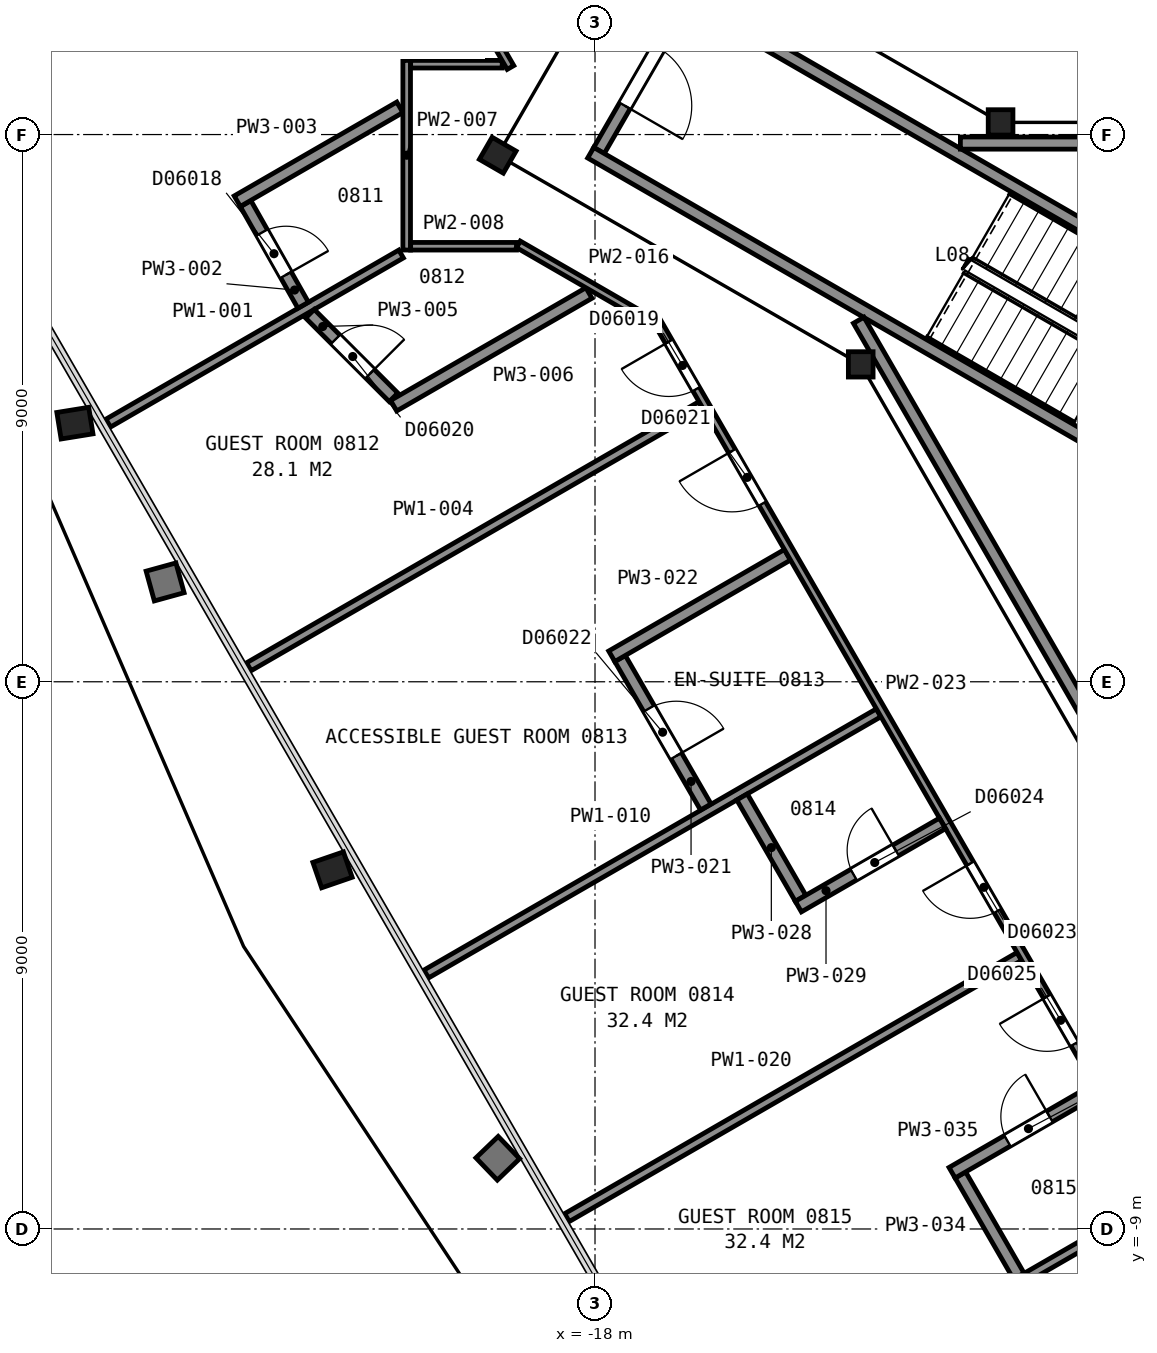
"""IFC4 building model, lengths in metres.
Left out: names, types, materials, properties, quantities, classifications, styles, units other than length and angle.
Written with IfcOpenShell. Run it as: python <this file> out.ifc"""

import sys

from ifc_helpers import new_model, si_unit, direction, frame, frame_2d, origin, origin_2d, place, context, subcontext, project, spatial, rectangle, i_section, extrude, element, fill, save


model = new_model("IFC4")
c1 = context("Model", 3, precision=1e-05, world=origin(), true_north=direction((0.0, 1.0)))
c2 = subcontext(c1, "Body", "Model", "MODEL_VIEW")
j1 = project(units=[si_unit("LENGTHUNIT", "METRE"), si_unit("PLANEANGLEUNIT", "RADIAN")], contexts=[c1])
p1 = place(None, origin())
s1 = spatial("IfcSite", under=j1, at=p1, CompositionType="ELEMENT")
p2 = place(p1, origin())
s2 = spatial("IfcBuilding", under=s1, at=p2, CompositionType="ELEMENT")
p3 = place(p2, frame((0.0, 0.0, 44.0)))
s3 = spatial("IfcBuildingStorey", under=s2, at=p3, CompositionType="ELEMENT", Elevation=44.0)
p4 = place(p3, frame((-26.452, 4.27, 0.025), z_axis=(-0.085775681498, -0.013907718326, 0.996217399885), x_axis=(-0.500475890564, 0.865194817097, -0.031013084871)))
e1 = element("IfcColumn", 1, at=p4, inside=s3, PredefinedType="COLUMN", context=c2, shape_type="SweptSolid", body=[
    extrude(i_section(OverallWidth=0.442, OverallDepth=0.531, WebThickness=0.066, FlangeThickness=0.106, FilletRadius=0.015, at=origin_2d()), origin(), (0.0, 0.0, 1.0), 3.563),
])
p5 = place(p3, frame((-22.222, -3.061, 0.025), z_axis=(-0.080308514275, -0.02761461711, 0.996387462515), x_axis=(-0.499182208178, 0.866345153128, -0.016223399441)))
e2 = element("IfcColumn", 2, at=p5, inside=s3, PredefinedType="COLUMN", context=c2, shape_type="SweptSolid", body=[
    extrude(i_section(OverallWidth=0.442, OverallDepth=0.531, WebThickness=0.066, FlangeThickness=0.106, FilletRadius=0.015, at=origin_2d()), origin(), (0.0, 0.0, 1.0), 3.563),
])
p6 = place(p3, frame((-11.33, 9.2, 0.0), z_axis=(0.0, 0.0, 1.0), x_axis=(1.0, 0.0, 0.0)))
e3 = element("IfcColumn", 3, at=p6, inside=s3, PredefinedType="COLUMN", context=c2, shape_type="SweptSolid", body=[
    extrude(i_section(OverallWidth=0.406, OverallDepth=0.417, WebThickness=0.03, FlangeThickness=0.048, FilletRadius=0.015, at=origin_2d()), origin(), (0.0, 0.0, 1.0), 3.6),
])
p7 = place(p3, frame((-19.6, 8.66, 0.0), z_axis=(0.0, 0.0, 1.0), x_axis=(0.5, 0.866025403784, 0.0)))
e4 = element("IfcColumn", 4, at=p7, inside=s3, PredefinedType="COLUMN", context=c2, shape_type="SweptSolid", body=[
    extrude(i_section(OverallWidth=0.419, OverallDepth=0.455, WebThickness=0.042, FlangeThickness=0.068, FilletRadius=0.015, at=origin_2d()), origin(), (0.0, 0.0, 1.0), 3.6),
])
p8 = place(p3, frame((-13.63, 5.22, 0.0), z_axis=(0.0, 0.0, 1.0), x_axis=(1.0, 0.0, 0.0)))
e5 = element("IfcColumn", 5, at=p8, inside=s3, PredefinedType="COLUMN", context=c2, shape_type="SweptSolid", body=[
    extrude(i_section(OverallWidth=0.406, OverallDepth=0.417, WebThickness=0.03, FlangeThickness=0.048, FilletRadius=0.015, at=origin_2d()), origin(), (0.0, 0.0, 1.0), 3.6),
])
p9 = place(p3, frame((-16.534, 11.162, 0.0), z_axis=(0.0, 0.0, 1.0), x_axis=(-0.49998411664, -0.866034573852, 0.0)))
e6 = element("IfcWall", 6, at=p9, inside=s3, PredefinedType="PARTITIONING", context=c2, shape_type="SweptSolid", body=[
    extrude(rectangle(XDim=2.8, YDim=0.2, at=frame_2d((1.4, 0.0))), origin(), (0.0, 0.0, 1.0), 3.35),
])
p10 = place(p9, frame((0.85, 0.0, 0.0)))
e7 = element("IfcOpeningElement", 7, at=p10, cuts=e6, PredefinedType="OPENING", context=c2, shape_type="SweptSolid", body=[
    extrude(rectangle(XDim=1.1, YDim=2.1, at=frame_2d((0.55, 1.05))), frame((0.0, 0.11, 0.0), z_axis=(0.0, -1.0, 0.0), x_axis=(1.0, 0.0, 0.0)), (0.0, 0.0, 1.0), 0.22),
])
for number, where, z_axis, x_axis in (
    (8, (-7.678, 2.701, 0.0), (0.0, 0.0, 1.0), (-0.866, 0.5, 0.0)),
    (9, (-6.178, 5.299, 0.0), (0.0, 0.0, 1.0), (-0.866, 0.5, 0.0)),
):
    element("IfcWall", number, at=place(p3, frame(where, z_axis=z_axis, x_axis=x_axis)), inside=s3, PredefinedType="PARTITIONING", context=c2, shape_type="SweptSolid", body=[
        extrude(rectangle(XDim=12.0, YDim=0.2, at=frame_2d((6.0, 0.0))), origin(), (0.0, 0.0, 1.0), 3.35),
    ])
p11 = place(p3, frame((-13.664, 5.946, 0.0), z_axis=(0.0, 0.0, 1.0), x_axis=(0.499994327219, -0.866028678941, 0.0)))
e10 = element("IfcWall", 10, at=p11, inside=s3, PredefinedType="PARTITIONING", context=c2, shape_type="SweptSolid", body=[
    extrude(rectangle(XDim=23.968, YDim=0.2, at=frame_2d((11.984, 0.0))), origin(), (0.0, 0.0, 1.0), 3.35),
])
p12 = place(p3, frame((0.263, 8.86, 0.0), z_axis=(0.0, 0.0, 1.0), x_axis=(-1.0, 0.0, 0.0)))
e11 = element("IfcWall", 11, at=p12, inside=s3, PredefinedType="PARTITIONING", context=c2, shape_type="SweptSolid", body=[
    extrude(rectangle(XDim=12.254, YDim=0.2, at=frame_2d((6.127, 0.0))), origin(), (0.0, 0.0, 1.0), 3.35),
])
p13 = place(p12, frame((5.709, 0.0, 0.0)))
e12 = element("IfcOpeningElement", 12, at=p13, cuts=e11, PredefinedType="OPENING", context=c2, shape_type="SweptSolid", body=[
    extrude(rectangle(XDim=1.8, YDim=2.1, at=frame_2d((0.9, 1.05))), frame((0.0, 0.11, 0.0), z_axis=(0.0, -1.0, 0.0), x_axis=(1.0, 0.0, 0.0)), (0.0, 0.0, 1.0), 0.22),
])
p14 = place(p3, frame((-26.006, 4.254, 0.0), z_axis=(0.0, 0.0, 1.0), x_axis=(0.865981654797, 0.500075767815, 0.0)))
e13 = element("IfcWall", 13, at=p14, inside=s3, PredefinedType="PARTITIONING", context=c2, shape_type="SweptSolid", body=[
    extrude(rectangle(XDim=5.563, YDim=0.15, at=frame_2d((2.781, 0.0))), origin(), (0.0, 0.0, 1.0), 2.613),
])
p15 = place(p3, frame((-23.745, 7.863, 0.0), z_axis=(0.0, 0.0, 1.0), x_axis=(0.492970842961, -0.870045830971, 0.0)))
e14 = element("IfcWall", 14, at=p15, inside=s3, PredefinedType="PARTITIONING", context=c2, shape_type="SweptSolid", body=[
    extrude(rectangle(XDim=1.919, YDim=0.2, at=frame_2d((0.959, 0.0))), origin(), (0.0, 0.0, 1.0), 2.613),
])
p16 = place(p15, frame((0.545, 0.0, 0.0)))
e15 = element("IfcOpeningElement", 15, at=p16, cuts=e14, PredefinedType="OPENING", context=c2, shape_type="SweptSolid", body=[
    extrude(rectangle(XDim=0.8, YDim=2.1, at=frame_2d((0.4, 1.05))), frame((0.0, 0.11, 0.0), z_axis=(0.0, -1.0, 0.0), x_axis=(1.0, 0.0, 0.0)), (0.0, 0.0, 1.0), 0.22),
])
p17 = place(p3, frame((-23.884, 7.904, 0.0), z_axis=(0.0, 0.0, 1.0), x_axis=(0.866015731669, 0.500016752221, 0.0)))
e16 = element("IfcWall", 16, at=p17, inside=s3, PredefinedType="PARTITIONING", context=c2, shape_type="SweptSolid", body=[
    extrude(rectangle(XDim=3.088, YDim=0.2, at=frame_2d((1.544, 0.0))), origin(), (0.0, 0.0, 1.0), 2.613),
])
p18 = place(p3, frame((-23.693, 0.247, 0.0), z_axis=(0.0, 0.0, 1.0), x_axis=(0.866031705461, 0.499989085017, 0.0)))
e17 = element("IfcWall", 17, at=p18, inside=s3, PredefinedType="PARTITIONING", context=c2, shape_type="SweptSolid", body=[
    extrude(rectangle(XDim=8.587, YDim=0.15, at=frame_2d((4.293, 0.0))), origin(), (0.0, 0.0, 1.0), 2.613),
])
p19 = place(p3, frame((-22.688, 6.053, 0.0), z_axis=(0.0, 0.0, 1.0), x_axis=(0.707106781187, -0.707106781187, 0.0)))
e18 = element("IfcWall", 18, at=p19, inside=s3, PredefinedType="PARTITIONING", context=c2, shape_type="SweptSolid", body=[
    extrude(rectangle(XDim=1.944, YDim=0.2, at=frame_2d((0.972, 0.0))), origin(), (0.0, 0.0, 1.0), 2.613),
])
p20 = place(p19, frame((0.595, 0.0, 0.0)))
e19 = element("IfcOpeningElement", 19, at=p20, cuts=e18, PredefinedType="OPENING", context=c2, shape_type="SweptSolid", body=[
    extrude(rectangle(XDim=0.8, YDim=2.1, at=frame_2d((0.4, 1.05))), frame((0.0, 0.11, 0.0), z_axis=(0.0, -1.0, 0.0), x_axis=(1.0, 0.0, 0.0)), (0.0, 0.0, 1.0), 0.22),
])
p21 = place(p3, frame((-21.312, 4.54, 0.0), z_axis=(0.0, 0.0, 1.0), x_axis=(0.866071583234, 0.499920006315, 0.0)))
e20 = element("IfcWall", 20, at=p21, inside=s3, PredefinedType="PARTITIONING", context=c2, shape_type="SweptSolid", body=[
    extrude(rectangle(XDim=3.708, YDim=0.2, at=frame_2d((1.854, 0.0))), origin(), (0.0, 0.0, 1.0), 2.613),
])
p22 = place(p3, frame((-21.097, 7.101, 0.0), z_axis=(0.0, 0.0, 1.0), x_axis=(0.0, 1.0, 0.0)))
e21 = element("IfcWall", 21, at=p22, inside=s3, PredefinedType="PARTITIONING", context=c2, shape_type="SweptSolid", body=[
    extrude(rectangle(XDim=3.119, YDim=0.125, at=frame_2d((1.56, 0.0))), origin(), (0.0, 0.0, 1.0), 2.613),
])
p23 = place(p3, frame((-21.032, 7.163, 0.0), z_axis=(0.0, 0.0, 1.0), x_axis=(1.0, 0.0, 0.0)))
e22 = element("IfcWall", 22, at=p23, inside=s3, PredefinedType="PARTITIONING", context=c2, shape_type="SweptSolid", body=[
    extrude(rectangle(XDim=1.741, YDim=0.125, at=frame_2d((0.871, 0.0))), origin(), (0.0, 0.0, 1.0), 2.613),
])
p24 = place(p3, frame((-21.032, 10.157, 0.0), z_axis=(0.0, 0.0, 1.0), x_axis=(1.0, 0.0, 0.0)))
e23 = element("IfcWall", 23, at=p24, inside=s3, PredefinedType="PARTITIONING", context=c2, shape_type="SweptSolid", body=[
    extrude(rectangle(XDim=1.506, YDim=0.125, at=frame_2d((0.753, 0.0))), origin(), (0.0, 0.0, 1.0), 2.613),
])
p25 = place(p3, frame((-20.775, -4.806, 0.0), z_axis=(0.0, 0.0, 1.0), x_axis=(0.865995804368, 0.50005126419, 0.0)))
e24 = element("IfcWall", 24, at=p25, inside=s3, PredefinedType="PARTITIONING", context=c2, shape_type="SweptSolid", body=[
    extrude(rectangle(XDim=8.591, YDim=0.15, at=frame_2d((4.295, 0.0))), origin(), (0.0, 0.0, 1.0), 2.613),
])
p26 = place(p3, frame((-20.293, 11.666, 0.0), z_axis=(0.0, 0.0, 1.0), x_axis=(0.500327160669, -0.865836435071, 0.0)))
e25 = element("IfcWall", 25, at=p26, inside=s3, PredefinedType="PARTITIONING", context=c2, shape_type="SweptSolid", body=[
    extrude(rectangle(XDim=1.805, YDim=0.125, at=frame_2d((0.903, 0.0))), origin(), (0.0, 0.0, 1.0), 2.613),
])
p27 = place(p3, frame((-19.26, 7.194, 0.0), z_axis=(0.0, 0.0, 1.0), x_axis=(0.865944638795, -0.50013986298, 0.0)))
e26 = element("IfcWall", 26, at=p27, inside=s3, PredefinedType="PARTITIONING", context=c2, shape_type="SweptSolid", body=[
    extrude(rectangle(XDim=2.599, YDim=0.125, at=frame_2d((1.299, 0.0))), origin(), (0.0, 0.0, 1.0), 2.613),
])
p28 = place(p3, frame((-18.462, -8.813, 0.0), z_axis=(0.0, 0.0, 1.0), x_axis=(0.866029425019, 0.499993034952, 0.0)))
e27 = element("IfcWall", 27, at=p28, inside=s3, PredefinedType="PARTITIONING", context=c2, shape_type="SweptSolid", body=[
    extrude(rectangle(XDim=8.591, YDim=0.15, at=frame_2d((4.296, 0.0))), origin(), (0.0, 0.0, 1.0), 2.613),
])
p29 = place(p3, frame((-17.588, 0.382, 0.0), z_axis=(0.0, 0.0, 1.0), x_axis=(0.499984757355, -0.866034203951, 0.0)))
e28 = element("IfcWall", 28, at=p29, inside=s3, PredefinedType="PARTITIONING", context=c2, shape_type="SweptSolid", body=[
    extrude(rectangle(XDim=2.82, YDim=0.2, at=frame_2d((1.41, 0.0))), origin(), (0.0, 0.0, 1.0), 2.613),
])
p30 = place(p29, frame((0.95, 0.0, 0.0)))
e29 = element("IfcOpeningElement", 29, at=p30, cuts=e28, PredefinedType="OPENING", context=c2, shape_type="SweptSolid", body=[
    extrude(rectangle(XDim=0.9, YDim=2.1, at=frame_2d((0.45, 1.05))), frame((0.0, 0.11, 0.0), z_axis=(0.0, -1.0, 0.0), x_axis=(1.0, 0.0, 0.0)), (0.0, 0.0, 1.0), 0.22),
])
p31 = place(p3, frame((-17.725, 0.419, 0.0), z_axis=(0.0, 0.0, 1.0), x_axis=(0.865960142641, 0.500113018585, 0.0)))
e30 = element("IfcWall", 30, at=p31, inside=s3, PredefinedType="PARTITIONING", context=c2, shape_type="SweptSolid", body=[
    extrude(rectangle(XDim=3.337, YDim=0.2, at=frame_2d((1.668, 0.0))), origin(), (0.0, 0.0, 1.0), 2.613),
])
p32 = place(p3, frame((-3.766, -16.958, 0.0), z_axis=(0.0, 0.0, 1.0), x_axis=(-0.500024758804, 0.866011108811, 0.0)))
e31 = element("IfcWall", 31, at=p32, inside=s3, PredefinedType="PARTITIONING", context=c2, shape_type="SweptSolid", body=[
    extrude(rectangle(XDim=26.402, YDim=0.125, at=frame_2d((13.201, 0.0))), origin(), (0.0, 0.0, 1.0), 2.613),
])
p33 = place(p32, frame((25.139, 0.0, 0.0)))
e32 = element("IfcOpeningElement", 32, at=p33, cuts=e31, PredefinedType="OPENING", context=c2, shape_type="SweptSolid", body=[
    extrude(rectangle(XDim=0.9, YDim=2.1, at=frame_2d((0.45, 1.05))), frame((0.0, 0.073, 0.0), z_axis=(0.0, -1.0, 0.0), x_axis=(1.0, 0.0, 0.0)), (0.0, 0.0, 1.0), 0.145),
])
p34 = place(p32, frame((22.963, 0.0, 0.0)))
e33 = element("IfcOpeningElement", 33, at=p34, cuts=e31, PredefinedType="OPENING", context=c2, shape_type="SweptSolid", body=[
    extrude(rectangle(XDim=1.0, YDim=2.1, at=frame_2d((0.5, 1.05))), frame((0.0, 0.073, 0.0), z_axis=(0.0, -1.0, 0.0), x_axis=(1.0, 0.0, 0.0)), (0.0, 0.0, 1.0), 0.145),
])
p35 = place(p32, frame((15.228, 0.0, 0.0)))
e34 = element("IfcOpeningElement", 34, at=p35, cuts=e31, PredefinedType="OPENING", context=c2, shape_type="SweptSolid", body=[
    extrude(rectangle(XDim=0.9, YDim=2.1, at=frame_2d((0.45, 1.05))), frame((0.0, 0.073, 0.0), z_axis=(0.0, -1.0, 0.0), x_axis=(1.0, 0.0, 0.0)), (0.0, 0.0, 1.0), 0.145),
])
p36 = place(p32, frame((12.702, 0.0, 0.0)))
e35 = element("IfcOpeningElement", 35, at=p36, cuts=e31, PredefinedType="OPENING", context=c2, shape_type="SweptSolid", body=[
    extrude(rectangle(XDim=0.9, YDim=2.1, at=frame_2d((0.45, 1.05))), frame((0.0, 0.073, 0.0), z_axis=(0.0, -1.0, 0.0), x_axis=(1.0, 0.0, 0.0)), (0.0, 0.0, 1.0), 0.145),
])
p37 = place(p32, frame((5.624, 0.0, 0.0)))
e36 = element("IfcOpeningElement", 36, at=p37, cuts=e31, PredefinedType="OPENING", context=c2, shape_type="SweptSolid", body=[
    extrude(rectangle(XDim=0.9, YDim=2.1, at=frame_2d((0.45, 1.05))), frame((0.0, 0.073, 0.0), z_axis=(0.0, -1.0, 0.0), x_axis=(1.0, 0.0, 0.0)), (0.0, 0.0, 1.0), 0.145),
])
p38 = place(p32, frame((2.843, 0.0, 0.0)))
e37 = element("IfcOpeningElement", 37, at=p38, cuts=e31, PredefinedType="OPENING", context=c2, shape_type="SweptSolid", body=[
    extrude(rectangle(XDim=0.9, YDim=2.1, at=frame_2d((0.45, 1.05))), frame((0.0, 0.073, 0.0), z_axis=(0.0, -1.0, 0.0), x_axis=(1.0, 0.0, 0.0)), (0.0, 0.0, 1.0), 0.145),
])
p39 = place(p3, frame((-16.148, -12.821, 0.0), z_axis=(0.0, 0.0, 1.0), x_axis=(0.866036528751, 0.499980730498, 0.0)))
e38 = element("IfcWall", 38, at=p39, inside=s3, PredefinedType="PARTITIONING", context=c2, shape_type="SweptSolid", body=[
    extrude(rectangle(XDim=8.592, YDim=0.15, at=frame_2d((4.296, 0.0))), origin(), (0.0, 0.0, 1.0), 2.613),
])
p40 = place(p3, frame((-15.582, -1.894, 0.0), z_axis=(0.0, 0.0, 1.0), x_axis=(0.500026156197, -0.86601030197, 0.0)))
e39 = element("IfcWall", 39, at=p40, inside=s3, PredefinedType="PARTITIONING", context=c2, shape_type="SweptSolid", body=[
    extrude(rectangle(XDim=1.925, YDim=0.2, at=frame_2d((0.963, 0.0))), origin(), (0.0, 0.0, 1.0), 2.613),
])
p41 = place(p3, frame((-14.656, -3.698, 0.0), z_axis=(0.0, 0.0, 1.0), x_axis=(0.866005850709, 0.50003386539, 0.0)))
e40 = element("IfcWall", 40, at=p41, inside=s3, PredefinedType="PARTITIONING", context=c2, shape_type="SweptSolid", body=[
    extrude(rectangle(XDim=2.737, YDim=0.2, at=frame_2d((1.369, 0.0))), origin(), (0.0, 0.0, 1.0), 2.613),
])
p42 = place(p41, frame((1.05, 0.0, 0.0)))
e41 = element("IfcOpeningElement", 41, at=p42, cuts=e40, PredefinedType="OPENING", context=c2, shape_type="SweptSolid", body=[
    extrude(rectangle(XDim=0.8, YDim=2.1, at=frame_2d((0.4, 1.05))), frame((0.0, 0.11, 0.0), z_axis=(0.0, -1.0, 0.0), x_axis=(1.0, 0.0, 0.0)), (0.0, 0.0, 1.0), 0.22),
])
p43 = place(p3, frame((-11.991, -8.112, 0.0), z_axis=(0.0, 0.0, 1.0), x_axis=(0.499913221443, -0.866075499611, 0.0)))
e42 = element("IfcWall", 42, at=p43, inside=s3, PredefinedType="PARTITIONING", context=c2, shape_type="SweptSolid", body=[
    extrude(rectangle(XDim=1.92, YDim=0.2, at=frame_2d((0.96, 0.0))), origin(), (0.0, 0.0, 1.0), 2.613),
])
p44 = place(p3, frame((-9.761, -6.709, 0.0), z_axis=(0.0, 0.0, 1.0), x_axis=(-0.866012976267, -0.500021524473, 0.0)))
e43 = element("IfcWall", 43, at=p44, inside=s3, PredefinedType="PARTITIONING", context=c2, shape_type="SweptSolid", body=[
    extrude(rectangle(XDim=2.732, YDim=0.2, at=frame_2d((1.366, 0.0))), origin(), (0.0, 0.0, 1.0), 2.613),
])
p45 = place(p44, frame((0.882, 0.0, 0.0)))
e44 = element("IfcOpeningElement", 44, at=p45, cuts=e43, PredefinedType="OPENING", context=c2, shape_type="SweptSolid", body=[
    extrude(rectangle(XDim=0.8, YDim=2.1, at=frame_2d((0.4, 1.05))), frame((0.0, 0.11, 0.0), z_axis=(0.0, -1.0, 0.0), x_axis=(1.0, 0.0, 0.0)), (0.0, 0.0, 1.0), 0.22),
])
p46 = place(p10, origin())
e45 = element("IfcDoor", 45, at=p46, inside=s3, OperationType="SINGLE_SWING_RIGHT", PredefinedType="DOOR", context=c2, shape_type="SweptSolid", body=[
    extrude(rectangle(XDim=1.1, YDim=2.1, at=frame_2d((0.55, 1.05))), frame((0.0, 0.025, 0.0), z_axis=(0.0, -1.0, 0.0), x_axis=(1.0, 0.0, 0.0)), (0.0, 0.0, 1.0), 0.05),
])
fill(e7, e45)
p47 = place(p16, origin())
e46 = element("IfcDoor", 46, at=p47, inside=s3, OperationType="SINGLE_SWING_RIGHT", PredefinedType="DOOR", context=c2, shape_type="SweptSolid", body=[
    extrude(rectangle(XDim=0.8, YDim=2.1, at=frame_2d((0.4, 1.05))), frame((0.0, 0.025, 0.0), z_axis=(0.0, -1.0, 0.0), x_axis=(1.0, 0.0, 0.0)), (0.0, 0.0, 1.0), 0.05),
])
fill(e15, e46)
p48 = place(p20, origin())
e47 = element("IfcDoor", 47, at=p48, inside=s3, OperationType="SINGLE_SWING_RIGHT", PredefinedType="DOOR", context=c2, shape_type="SweptSolid", body=[
    extrude(rectangle(XDim=0.8, YDim=2.1, at=frame_2d((0.4, 1.05))), frame((0.0, 0.025, 0.0), z_axis=(0.0, -1.0, 0.0), x_axis=(1.0, 0.0, 0.0)), (0.0, 0.0, 1.0), 0.05),
])
fill(e19, e47)
p49 = place(p30, origin())
e48 = element("IfcDoor", 48, at=p49, inside=s3, OperationType="SINGLE_SWING_RIGHT", PredefinedType="DOOR", context=c2, shape_type="SweptSolid", body=[
    extrude(rectangle(XDim=0.9, YDim=2.1, at=frame_2d((0.45, 1.05))), frame((0.0, 0.025, 0.0), z_axis=(0.0, -1.0, 0.0), x_axis=(1.0, 0.0, 0.0)), (0.0, 0.0, 1.0), 0.05),
])
fill(e29, e48)
p50 = place(p33, origin())
e49 = element("IfcDoor", 49, at=p50, inside=s3, OperationType="SINGLE_SWING_RIGHT", PredefinedType="DOOR", context=c2, shape_type="SweptSolid", body=[
    extrude(rectangle(XDim=0.9, YDim=2.1, at=frame_2d((0.45, 1.05))), frame((0.0, 0.025, 0.0), z_axis=(0.0, -1.0, 0.0), x_axis=(1.0, 0.0, 0.0)), (0.0, 0.0, 1.0), 0.05),
])
fill(e32, e49)
p51 = place(p34, origin())
e50 = element("IfcDoor", 50, at=p51, inside=s3, OperationType="SINGLE_SWING_RIGHT", PredefinedType="DOOR", context=c2, shape_type="SweptSolid", body=[
    extrude(rectangle(XDim=1.0, YDim=2.1, at=frame_2d((0.5, 1.05))), frame((0.0, 0.025, 0.0), z_axis=(0.0, -1.0, 0.0), x_axis=(1.0, 0.0, 0.0)), (0.0, 0.0, 1.0), 0.05),
])
fill(e33, e50)
p52 = place(p35, origin())
e51 = element("IfcDoor", 51, at=p52, inside=s3, OperationType="SINGLE_SWING_RIGHT", PredefinedType="DOOR", context=c2, shape_type="SweptSolid", body=[
    extrude(rectangle(XDim=0.9, YDim=2.1, at=frame_2d((0.45, 1.05))), frame((0.0, 0.025, 0.0), z_axis=(0.0, -1.0, 0.0), x_axis=(1.0, 0.0, 0.0)), (0.0, 0.0, 1.0), 0.05),
])
fill(e34, e51)
p53 = place(p36, origin())
e52 = element("IfcDoor", 52, at=p53, inside=s3, OperationType="SINGLE_SWING_RIGHT", PredefinedType="DOOR", context=c2, shape_type="SweptSolid", body=[
    extrude(rectangle(XDim=0.9, YDim=2.1, at=frame_2d((0.45, 1.05))), frame((0.0, 0.025, 0.0), z_axis=(0.0, -1.0, 0.0), x_axis=(1.0, 0.0, 0.0)), (0.0, 0.0, 1.0), 0.05),
])
fill(e35, e52)
p54 = place(p42, origin())
e53 = element("IfcDoor", 53, at=p54, inside=s3, OperationType="SINGLE_SWING_RIGHT", PredefinedType="DOOR", context=c2, shape_type="SweptSolid", body=[
    extrude(rectangle(XDim=0.8, YDim=2.1, at=frame_2d((0.4, 1.05))), frame((0.0, 0.025, 0.0), z_axis=(0.0, -1.0, 0.0), x_axis=(1.0, 0.0, 0.0)), (0.0, 0.0, 1.0), 0.05),
])
fill(e41, e53)
p55 = place(p45, origin())
e54 = element("IfcDoor", 54, at=p55, inside=s3, OperationType="SINGLE_SWING_LEFT", PredefinedType="DOOR", context=c2, shape_type="SweptSolid", body=[
    extrude(rectangle(XDim=0.8, YDim=2.1, at=frame_2d((0.4, 1.05))), frame((0.0, 0.025, 0.0), z_axis=(0.0, -1.0, 0.0), x_axis=(1.0, 0.0, 0.0)), (0.0, 0.0, 1.0), 0.05),
])
fill(e44, e54)
save(model, sys.argv[1])
